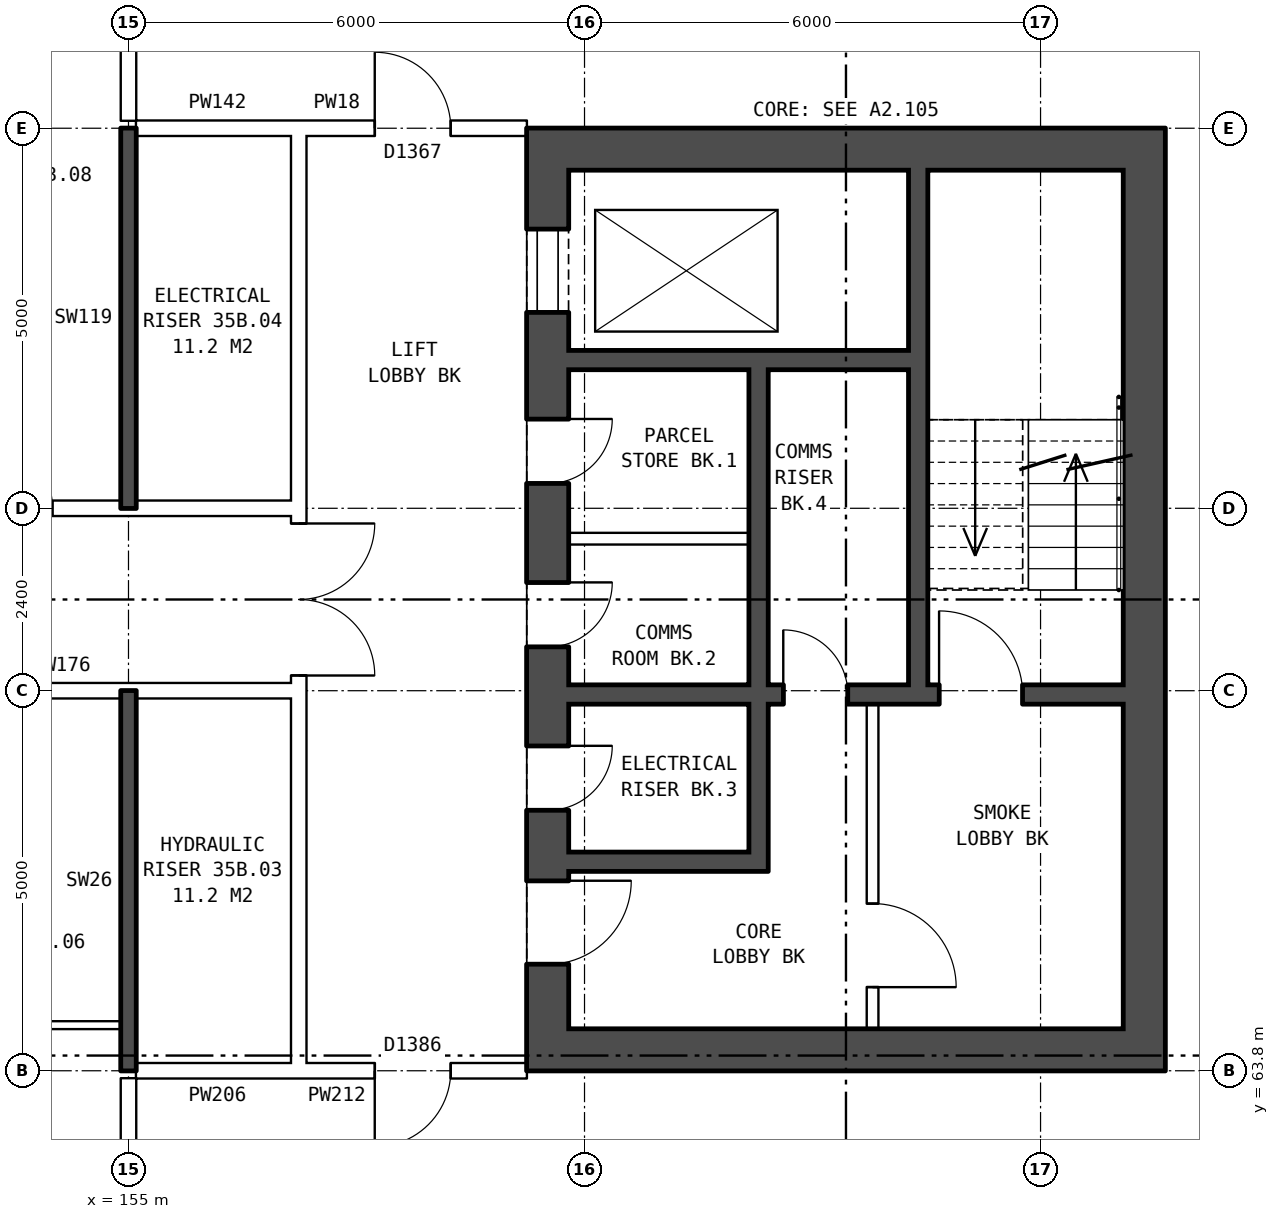
"""IFC4 building model, lengths in metres.
Left out: names, types, materials, properties, quantities, classifications, styles, units other than length and angle.
Written with IfcOpenShell. Run it as: python <this file> out.ifc"""

import sys

from ifc_helpers import new_model, si_unit, direction, frame, frame_2d, origin, place, context, subcontext, project, spatial, rectangle, extrude, element, fill, save


model = new_model("IFC4")
c1 = context("Model", 3, precision=1e-05, world=origin(), true_north=direction((0.0, 1.0)))
c2 = subcontext(c1, "Body", "Model", "MODEL_VIEW")
j1 = project(units=[si_unit("LENGTHUNIT", "METRE"), si_unit("PLANEANGLEUNIT", "RADIAN")], contexts=[c1])
p1 = place(None, origin())
s1 = spatial("IfcSite", under=j1, at=p1, CompositionType="ELEMENT")
p2 = place(p1, origin())
s2 = spatial("IfcBuilding", under=s1, at=p2, CompositionType="ELEMENT")
p3 = place(p2, frame((0.0, 0.0, 126.8)))
s3 = spatial("IfcBuildingStorey", under=s2, at=p3, CompositionType="ELEMENT", Elevation=126.8)
p4 = place(p3, frame((160.515, 76.2, 0.0), z_axis=(0.0, 0.0, 1.0), x_axis=(0.0, -1.0, 0.0)))
e1 = element("IfcWall", 1, at=p4, inside=s3, PredefinedType="SHEAR", context=c2, shape_type="SweptSolid", body=[
    extrude(rectangle(XDim=12.4, YDim=0.55, at=frame_2d((6.2, 0.0))), origin(), (0.0, 0.0, 1.0), 2.85),
])
p5 = place(p4, frame((1.325, 0.0, 0.0)))
e2 = element("IfcOpeningElement", 2, at=p5, cuts=e1, PredefinedType="OPENING", context=c2, shape_type="SweptSolid", body=[
    extrude(rectangle(XDim=1.1, YDim=2.1, at=frame_2d((0.55, 1.05))), frame((0.0, 0.285, 0.0), z_axis=(0.0, -1.0, 0.0), x_axis=(1.0, 0.0, 0.0)), (0.0, 0.0, 1.0), 0.57),
])
p6 = place(p4, frame((3.825, 0.0, 0.0)))
e3 = element("IfcOpeningElement", 3, at=p6, cuts=e1, PredefinedType="OPENING", context=c2, shape_type="SweptSolid", body=[
    extrude(rectangle(XDim=0.85, YDim=2.1, at=frame_2d((0.425, 1.05))), frame((0.0, 0.285, 0.0), z_axis=(0.0, -1.0, 0.0), x_axis=(1.0, 0.0, 0.0)), (0.0, 0.0, 1.0), 0.57),
])
p7 = place(p4, frame((5.975, 0.0, 0.0)))
e4 = element("IfcOpeningElement", 4, at=p7, cuts=e1, PredefinedType="OPENING", context=c2, shape_type="SweptSolid", body=[
    extrude(rectangle(XDim=0.85, YDim=2.1, at=frame_2d((0.425, 1.05))), frame((0.0, 0.285, 0.0), z_axis=(0.0, -1.0, 0.0), x_axis=(1.0, 0.0, 0.0)), (0.0, 0.0, 1.0), 0.57),
])
p8 = place(p4, frame((9.9, 0.0, 0.0)))
e5 = element("IfcOpeningElement", 5, at=p8, cuts=e1, PredefinedType="OPENING", context=c2, shape_type="SweptSolid", body=[
    extrude(rectangle(XDim=1.1, YDim=2.1, at=frame_2d((0.55, 1.05))), frame((0.0, 0.285, 0.0), z_axis=(0.0, -1.0, 0.0), x_axis=(1.0, 0.0, 0.0)), (0.0, 0.0, 1.0), 0.57),
])
p9 = place(p4, frame((8.125, 0.0, 0.0)))
e6 = element("IfcOpeningElement", 6, at=p9, cuts=e1, PredefinedType="OPENING", context=c2, shape_type="SweptSolid", body=[
    extrude(rectangle(XDim=0.85, YDim=2.1, at=frame_2d((0.425, 1.05))), frame((0.0, 0.285, 0.0), z_axis=(0.0, -1.0, 0.0), x_axis=(1.0, 0.0, 0.0)), (0.0, 0.0, 1.0), 0.57),
])
p10 = place(p3, frame((168.365, 76.2, 0.0), z_axis=(0.0, 0.0, 1.0), x_axis=(0.0, -1.0, 0.0)))
e7 = element("IfcWall", 7, at=p10, inside=s3, PredefinedType="SHEAR", context=c2, shape_type="SweptSolid", body=[
    extrude(rectangle(XDim=12.4, YDim=0.55, at=frame_2d((6.2, 0.0))), origin(), (0.0, 0.0, 1.0), 2.85),
])
for number, where, z_axis, x_axis in (
    (8, (160.79, 75.925, 0.0), (0.0, 0.0, 1.0), (1.0, 0.0, 0.0)),
    (9, (160.79, 64.075, 0.0), (0.0, 0.0, 1.0), (1.0, 0.0, 0.0)),
):
    element("IfcWall", number, at=place(p3, frame(where, z_axis=z_axis, x_axis=x_axis)), inside=s3, PredefinedType="SHEAR", context=c2, shape_type="SweptSolid", body=[
        extrude(rectangle(XDim=7.3, YDim=0.55, at=frame_2d((3.65, 0.0))), origin(), (0.0, 0.0, 1.0), 2.85),
    ])
p11 = place(p3, frame((160.79, 73.15, 0.0), z_axis=(0.0, 0.0, 1.0), x_axis=(1.0, 0.0, 0.0)))
e10 = element("IfcWall", 10, at=p11, inside=s3, PredefinedType="SHEAR", context=c2, shape_type="SweptSolid", body=[
    extrude(rectangle(XDim=4.475, YDim=0.25, at=frame_2d((2.237, 0.0))), origin(), (0.0, 0.0, 1.0), 2.85),
])
p12 = place(p3, frame((160.79, 70.8, 0.0), z_axis=(0.0, 0.0, 1.0), x_axis=(1.0, 0.0, 0.0)))
e11 = element("IfcWall", 11, at=p12, inside=s3, PredefinedType="PARTITIONING", context=c2, shape_type="SweptSolid", body=[
    extrude(rectangle(XDim=2.375, YDim=0.15, at=frame_2d((1.188, 0.0))), origin(), (0.0, 0.0, 1.0), 2.85),
])
p13 = place(p3, frame((160.79, 68.75, 0.0), z_axis=(0.0, 0.0, 1.0), x_axis=(1.0, 0.0, 0.0)))
e12 = element("IfcWall", 12, at=p13, inside=s3, PredefinedType="SHEAR", context=c2, shape_type="SweptSolid", body=[
    extrude(rectangle(XDim=7.3, YDim=0.25, at=frame_2d((3.65, 0.0))), origin(), (0.0, 0.0, 1.0), 2.85),
])
p14 = place(p13, frame((4.875, 0.0, 0.0)))
e13 = element("IfcOpeningElement", 13, at=p14, cuts=e12, PredefinedType="OPENING", context=c2, shape_type="SweptSolid", body=[
    extrude(rectangle(XDim=1.1, YDim=2.1, at=frame_2d((0.55, 1.05))), frame((0.0, 0.135, 0.0), z_axis=(0.0, -1.0, 0.0), x_axis=(1.0, 0.0, 0.0)), (0.0, 0.0, 1.0), 0.27),
])
p15 = place(p13, frame((2.825, 0.0, 0.0)))
e14 = element("IfcOpeningElement", 14, at=p15, cuts=e12, PredefinedType="OPENING", context=c2, shape_type="SweptSolid", body=[
    extrude(rectangle(XDim=0.85, YDim=2.1, at=frame_2d((0.425, 1.05))), frame((0.0, 0.135, 0.0), z_axis=(0.0, -1.0, 0.0), x_axis=(1.0, 0.0, 0.0)), (0.0, 0.0, 1.0), 0.27),
])
p16 = place(p3, frame((160.79, 66.55, 0.0), z_axis=(0.0, 0.0, 1.0), x_axis=(1.0, 0.0, 0.0)))
e15 = element("IfcWall", 15, at=p16, inside=s3, PredefinedType="SHEAR", context=c2, shape_type="SweptSolid", body=[
    extrude(rectangle(XDim=2.375, YDim=0.25, at=frame_2d((1.188, 0.0))), origin(), (0.0, 0.0, 1.0), 2.85),
])
p17 = place(p3, frame((163.29, 73.025, 0.0), z_axis=(0.0, 0.0, 1.0), x_axis=(0.0, -1.0, 0.0)))
e16 = element("IfcWall", 16, at=p17, inside=s3, PredefinedType="SHEAR", context=c2, shape_type="SweptSolid", body=[
    extrude(rectangle(XDim=4.15, YDim=0.25, at=frame_2d((2.075, 0.0))), origin(), (0.0, 0.0, 1.0), 2.85),
])
p18 = place(p3, frame((163.29, 68.625, 0.0), z_axis=(0.0, 0.0, 1.0), x_axis=(0.0, -1.0, 0.0)))
e17 = element("IfcWall", 17, at=p18, inside=s3, PredefinedType="SHEAR", context=c2, shape_type="SweptSolid", body=[
    extrude(rectangle(XDim=2.2, YDim=0.25, at=frame_2d((1.1, 0.0))), origin(), (0.0, 0.0, 1.0), 2.85),
])
p19 = place(p3, frame((164.79, 68.625, 0.0), z_axis=(0.0, 0.0, 1.0), x_axis=(0.0, -1.0, 0.0)))
e18 = element("IfcWall", 18, at=p19, inside=s3, PredefinedType="PARTITIONING", context=c2, shape_type="SweptSolid", body=[
    extrude(rectangle(XDim=4.275, YDim=0.15, at=frame_2d((2.137, 0.0))), origin(), (0.0, 0.0, 1.0), 2.85),
])
p20 = place(p19, frame((2.625, 0.0, 0.0)))
e19 = element("IfcOpeningElement", 19, at=p20, cuts=e18, PredefinedType="OPENING", context=c2, shape_type="SweptSolid", body=[
    extrude(rectangle(XDim=1.1, YDim=2.1, at=frame_2d((0.55, 1.05))), frame((0.0, 0.085, 0.0), z_axis=(0.0, -1.0, 0.0), x_axis=(1.0, 0.0, 0.0)), (0.0, 0.0, 1.0), 0.17),
])
p21 = place(p3, frame((165.39, 75.65, 0.0), z_axis=(0.0, 0.0, 1.0), x_axis=(0.0, -1.0, 0.0)))
e20 = element("IfcWall", 20, at=p21, inside=s3, PredefinedType="SHEAR", context=c2, shape_type="SweptSolid", body=[
    extrude(rectangle(XDim=6.775, YDim=0.25, at=frame_2d((3.387, 0.0))), origin(), (0.0, 0.0, 1.0), 2.85),
])
p22 = place(p3, frame((157.24, 63.9, 0.0), z_axis=(0.0, 0.0, 1.0), x_axis=(0.0, 1.0, 0.0)))
e21 = element("IfcWall", 21, at=p22, inside=s3, PredefinedType="PARTITIONING", context=c2, shape_type="SweptSolid", body=[
    extrude(rectangle(XDim=12.2, YDim=0.2, at=frame_2d((6.1, 0.0))), origin(), (0.0, 0.0, 1.0), 2.85),
])
p23 = place(p22, frame((5.1, 0.0, 0.0)))
e22 = element("IfcOpeningElement", 22, at=p23, cuts=e21, PredefinedType="OPENING", context=c2, shape_type="SweptSolid", body=[
    extrude(rectangle(XDim=2.0, YDim=2.1, at=frame_2d((1.0, 1.05))), frame((0.0, 0.11, 0.0), z_axis=(0.0, -1.0, 0.0), x_axis=(1.0, 0.0, 0.0)), (0.0, 0.0, 1.0), 0.22),
])
p24 = place(p3, frame((155.1, 63.8, 0.0), z_axis=(0.0, 0.0, 1.0), x_axis=(1.0, 0.0, 0.0)))
e23 = element("IfcWall", 23, at=p24, inside=s3, PredefinedType="PARTITIONING", context=c2, shape_type="SweptSolid", body=[
    extrude(rectangle(XDim=2.14, YDim=0.2, at=frame_2d((1.07, 0.0))), origin(), (0.0, 0.0, 1.0), 2.85),
])
p25 = place(p3, frame((157.24, 63.8, 0.0), z_axis=(0.0, 0.0, 1.0), x_axis=(1.0, 0.0, 0.0)))
e24 = element("IfcWall", 24, at=p25, inside=s3, PredefinedType="PARTITIONING", context=c2, shape_type="SweptSolid", body=[
    extrude(rectangle(XDim=3.0, YDim=0.2, at=frame_2d((1.5, 0.0))), origin(), (0.0, 0.0, 1.0), 2.85),
])
p26 = place(p25, frame((1.0, 0.0, 0.0)))
e25 = element("IfcOpeningElement", 25, at=p26, cuts=e24, PredefinedType="OPENING", context=c2, shape_type="SweptSolid", body=[
    extrude(rectangle(XDim=1.0, YDim=2.1, at=frame_2d((0.5, 1.05))), frame((0.0, 0.11, 0.0), z_axis=(0.0, -1.0, 0.0), x_axis=(1.0, 0.0, 0.0)), (0.0, 0.0, 1.0), 0.22),
])
p27 = place(p3, frame((152.0, 64.4, 0.0), z_axis=(0.0, 0.0, 1.0), x_axis=(1.0, 0.0, 0.0)))
e26 = element("IfcWall", 26, at=p27, inside=s3, PredefinedType="PARTITIONING", context=c2, shape_type="SweptSolid", body=[
    extrude(rectangle(XDim=2.9, YDim=0.1, at=frame_2d((1.45, 0.0))), origin(), (0.0, 0.0, 1.0), 2.85),
])
p28 = place(p3, frame((142.76, 68.8, 0.0), z_axis=(0.0, 0.0, 1.0), x_axis=(1.0, 0.0, 0.0)))
e27 = element("IfcWall", 27, at=p28, inside=s3, PredefinedType="PARTITIONING", context=c2, shape_type="SweptSolid", body=[
    extrude(rectangle(XDim=14.48, YDim=0.2, at=frame_2d((7.24, 0.0))), origin(), (0.0, 0.0, 1.0), 2.85),
])
p29 = place(p28, frame((1.12, 0.0, 0.0)))
e28 = element("IfcOpeningElement", 28, at=p29, cuts=e27, PredefinedType="OPENING", context=c2, shape_type="SweptSolid", body=[
    extrude(rectangle(XDim=1.0, YDim=2.1, at=frame_2d((0.5, 1.05))), frame((0.0, 0.11, 0.0), z_axis=(0.0, -1.0, 0.0), x_axis=(1.0, 0.0, 0.0)), (0.0, 0.0, 1.0), 0.22),
])
p30 = place(p28, frame((7.24, 0.0, 0.0)))
e29 = element("IfcOpeningElement", 29, at=p30, cuts=e27, PredefinedType="OPENING", context=c2, shape_type="SweptSolid", body=[
    extrude(rectangle(XDim=1.0, YDim=2.1, at=frame_2d((0.5, 1.05))), frame((0.0, 0.11, 0.0), z_axis=(0.0, -1.0, 0.0), x_axis=(1.0, 0.0, 0.0)), (0.0, 0.0, 1.0), 0.22),
])
p31 = place(p3, frame((142.76, 71.2, 0.0), z_axis=(0.0, 0.0, 1.0), x_axis=(1.0, 0.0, 0.0)))
e30 = element("IfcWall", 30, at=p31, inside=s3, PredefinedType="PARTITIONING", context=c2, shape_type="SweptSolid", body=[
    extrude(rectangle(XDim=14.48, YDim=0.2, at=frame_2d((7.24, 0.0))), origin(), (0.0, 0.0, 1.0), 2.85),
])
p32 = place(p31, frame((1.12, 0.0, 0.0)))
e31 = element("IfcOpeningElement", 31, at=p32, cuts=e30, PredefinedType="OPENING", context=c2, shape_type="SweptSolid", body=[
    extrude(rectangle(XDim=1.0, YDim=2.1, at=frame_2d((0.5, 1.05))), frame((0.0, 0.11, 0.0), z_axis=(0.0, -1.0, 0.0), x_axis=(1.0, 0.0, 0.0)), (0.0, 0.0, 1.0), 0.22),
])
p33 = place(p31, frame((10.24, 0.0, 0.0)))
e32 = element("IfcOpeningElement", 32, at=p33, cuts=e30, PredefinedType="OPENING", context=c2, shape_type="SweptSolid", body=[
    extrude(rectangle(XDim=1.0, YDim=2.1, at=frame_2d((0.5, 1.05))), frame((0.0, 0.11, 0.0), z_axis=(0.0, -1.0, 0.0), x_axis=(1.0, 0.0, 0.0)), (0.0, 0.0, 1.0), 0.22),
])
p34 = place(p3, frame((155.1, 76.2, 0.0), z_axis=(0.0, 0.0, 1.0), x_axis=(1.0, 0.0, 0.0)))
e33 = element("IfcWall", 33, at=p34, inside=s3, PredefinedType="PARTITIONING", context=c2, shape_type="SweptSolid", body=[
    extrude(rectangle(XDim=2.14, YDim=0.2, at=frame_2d((1.07, 0.0))), origin(), (0.0, 0.0, 1.0), 2.85),
])
p35 = place(p3, frame((157.24, 76.2, 0.0), z_axis=(0.0, 0.0, 1.0), x_axis=(1.0, 0.0, 0.0)))
e34 = element("IfcWall", 34, at=p35, inside=s3, PredefinedType="PARTITIONING", context=c2, shape_type="SweptSolid", body=[
    extrude(rectangle(XDim=3.0, YDim=0.2, at=frame_2d((1.5, 0.0))), origin(), (0.0, 0.0, 1.0), 2.85),
])
p36 = place(p35, frame((1.0, 0.0, 0.0)))
e35 = element("IfcOpeningElement", 35, at=p36, cuts=e34, PredefinedType="OPENING", context=c2, shape_type="SweptSolid", body=[
    extrude(rectangle(XDim=1.0, YDim=2.1, at=frame_2d((0.5, 1.05))), frame((0.0, 0.11, 0.0), z_axis=(0.0, -1.0, 0.0), x_axis=(1.0, 0.0, 0.0)), (0.0, 0.0, 1.0), 0.22),
])
p37 = place(p3, frame((155.0, 61.5, 0.0), z_axis=(0.0, 0.0, 1.0), x_axis=(0.0, 1.0, 0.0)))
e36 = element("IfcWall", 36, at=p37, inside=s3, PredefinedType="PARTITIONING", context=c2, shape_type="SweptSolid", body=[
    extrude(rectangle(XDim=2.2, YDim=0.2, at=frame_2d((1.1, 0.0))), origin(), (0.0, 0.0, 1.0), 2.85),
])
for number, where, z_axis, x_axis in (
    (37, (155.0, 63.8, 0.0), (0.0, 0.0, 1.0), (0.0, 1.0, 0.0)),
    (38, (155.0, 71.2, 0.0), (0.0, 0.0, 1.0), (0.0, 1.0, 0.0)),
):
    element("IfcWall", number, at=place(p3, frame(where, z_axis=z_axis, x_axis=x_axis)), inside=s3, PredefinedType="SOLIDWALL", context=c2, shape_type="SweptSolid", body=[
        extrude(rectangle(XDim=5.0, YDim=0.2, at=frame_2d((2.5, 0.0))), origin(), (0.0, 0.0, 1.0), 2.85),
    ])
p38 = place(p3, frame((155.0, 76.3, 0.0), z_axis=(0.0, 0.0, 1.0), x_axis=(0.0, 1.0, 0.0)))
e39 = element("IfcWall", 39, at=p38, inside=s3, PredefinedType="PARTITIONING", context=c2, shape_type="SweptSolid", body=[
    extrude(rectangle(XDim=2.2, YDim=0.2, at=frame_2d((1.1, 0.0))), origin(), (0.0, 0.0, 1.0), 2.85),
])
p39 = place(p5, origin())
e40 = element("IfcDoor", 40, at=p39, inside=s3, OperationType="DOUBLE_DOOR_SLIDING", PredefinedType="DOOR", context=c2, shape_type="SweptSolid", body=[
    extrude(rectangle(XDim=1.1, YDim=2.1, at=frame_2d((0.55, 1.05))), frame((0.0, 0.26, 0.0), z_axis=(0.0, -1.0, 0.0), x_axis=(1.0, 0.0, 0.0)), (0.0, 0.0, 1.0), 0.05),
])
fill(e2, e40)
p40 = place(p6, origin())
e41 = element("IfcDoor", 41, at=p40, inside=s3, OperationType="SINGLE_SWING_LEFT", PredefinedType="DOOR", context=c2, shape_type="SweptSolid", body=[
    extrude(rectangle(XDim=0.85, YDim=2.1, at=frame_2d((0.425, 1.05))), frame((0.0, 0.26, 0.0), z_axis=(0.0, -1.0, 0.0), x_axis=(1.0, 0.0, 0.0)), (0.0, 0.0, 1.0), 0.05),
])
fill(e3, e41)
p41 = place(p7, origin())
e42 = element("IfcDoor", 42, at=p41, inside=s3, OperationType="SINGLE_SWING_LEFT", PredefinedType="DOOR", context=c2, shape_type="SweptSolid", body=[
    extrude(rectangle(XDim=0.85, YDim=2.1, at=frame_2d((0.425, 1.05))), frame((0.0, 0.26, 0.0), z_axis=(0.0, -1.0, 0.0), x_axis=(1.0, 0.0, 0.0)), (0.0, 0.0, 1.0), 0.05),
])
fill(e4, e42)
p42 = place(p8, origin())
e43 = element("IfcDoor", 43, at=p42, inside=s3, OperationType="SINGLE_SWING_LEFT", PredefinedType="DOOR", context=c2, shape_type="SweptSolid", body=[
    extrude(rectangle(XDim=1.1, YDim=2.1, at=frame_2d((0.55, 1.05))), frame((0.0, 0.26, 0.0), z_axis=(0.0, -1.0, 0.0), x_axis=(1.0, 0.0, 0.0)), (0.0, 0.0, 1.0), 0.05),
])
fill(e5, e43)
p43 = place(p20, origin())
e44 = element("IfcDoor", 44, at=p43, inside=s3, OperationType="SINGLE_SWING_RIGHT", PredefinedType="DOOR", context=c2, shape_type="SweptSolid", body=[
    extrude(rectangle(XDim=1.1, YDim=2.1, at=frame_2d((0.55, 1.05))), frame((0.0, 0.025, 0.0), z_axis=(0.0, -1.0, 0.0), x_axis=(1.0, 0.0, 0.0)), (0.0, 0.0, 1.0), 0.05),
])
fill(e19, e44)
p44 = place(p14, origin())
e45 = element("IfcDoor", 45, at=p44, inside=s3, OperationType="SINGLE_SWING_LEFT", PredefinedType="DOOR", context=c2, shape_type="SweptSolid", body=[
    extrude(rectangle(XDim=1.1, YDim=2.1, at=frame_2d((0.55, 1.05))), frame((0.0, 0.025, 0.0), z_axis=(0.0, -1.0, 0.0), x_axis=(1.0, 0.0, 0.0)), (0.0, 0.0, 1.0), 0.05),
])
fill(e13, e45)
p45 = place(p9, origin())
e46 = element("IfcDoor", 46, at=p45, inside=s3, OperationType="SINGLE_SWING_LEFT", PredefinedType="DOOR", context=c2, shape_type="SweptSolid", body=[
    extrude(rectangle(XDim=0.85, YDim=2.1, at=frame_2d((0.425, 1.05))), frame((0.0, 0.26, 0.0), z_axis=(0.0, -1.0, 0.0), x_axis=(1.0, 0.0, 0.0)), (0.0, 0.0, 1.0), 0.05),
])
fill(e6, e46)
p46 = place(p15, origin())
e47 = element("IfcDoor", 47, at=p46, inside=s3, OperationType="SINGLE_SWING_LEFT", PredefinedType="DOOR", context=c2, shape_type="SweptSolid", body=[
    extrude(rectangle(XDim=0.85, YDim=2.1, at=frame_2d((0.425, 1.05))), frame((0.0, 0.025, 0.0), z_axis=(0.0, -1.0, 0.0), x_axis=(1.0, 0.0, 0.0)), (0.0, 0.0, 1.0), 0.05),
])
fill(e14, e47)
p47 = place(p23, frame((2.0, 0.0, 0.0), z_axis=(0.0, 0.0, 1.0), x_axis=(-1.0, 0.0, 0.0)))
e48 = element("IfcDoor", 48, at=p47, inside=s3, OperationType="DOUBLE_DOOR_SINGLE_SWING", PredefinedType="DOOR", context=c2, shape_type="SweptSolid", body=[
    extrude(rectangle(XDim=2.0, YDim=2.1, at=frame_2d((1.0, 1.05))), frame((0.0, 0.025, 0.0), z_axis=(0.0, -1.0, 0.0), x_axis=(1.0, 0.0, 0.0)), (0.0, 0.0, 1.0), 0.05),
])
fill(e22, e48)
p48 = place(p26, frame((1.0, 0.0, 0.0), z_axis=(0.0, 0.0, 1.0), x_axis=(-1.0, 0.0, 0.0)))
e49 = element("IfcDoor", 49, at=p48, inside=s3, OperationType="SINGLE_SWING_RIGHT", PredefinedType="DOOR", context=c2, shape_type="SweptSolid", body=[
    extrude(rectangle(XDim=1.0, YDim=2.1, at=frame_2d((0.5, 1.05))), frame((0.0, 0.025, 0.0), z_axis=(0.0, -1.0, 0.0), x_axis=(1.0, 0.0, 0.0)), (0.0, 0.0, 1.0), 0.05),
])
fill(e25, e49)
p49 = place(p36, origin())
e50 = element("IfcDoor", 50, at=p49, inside=s3, OperationType="SINGLE_SWING_LEFT", PredefinedType="DOOR", context=c2, shape_type="SweptSolid", body=[
    extrude(rectangle(XDim=1.0, YDim=2.1, at=frame_2d((0.5, 1.05))), frame((0.0, 0.025, 0.0), z_axis=(0.0, -1.0, 0.0), x_axis=(1.0, 0.0, 0.0)), (0.0, 0.0, 1.0), 0.05),
])
fill(e35, e50)
save(model, sys.argv[1])
